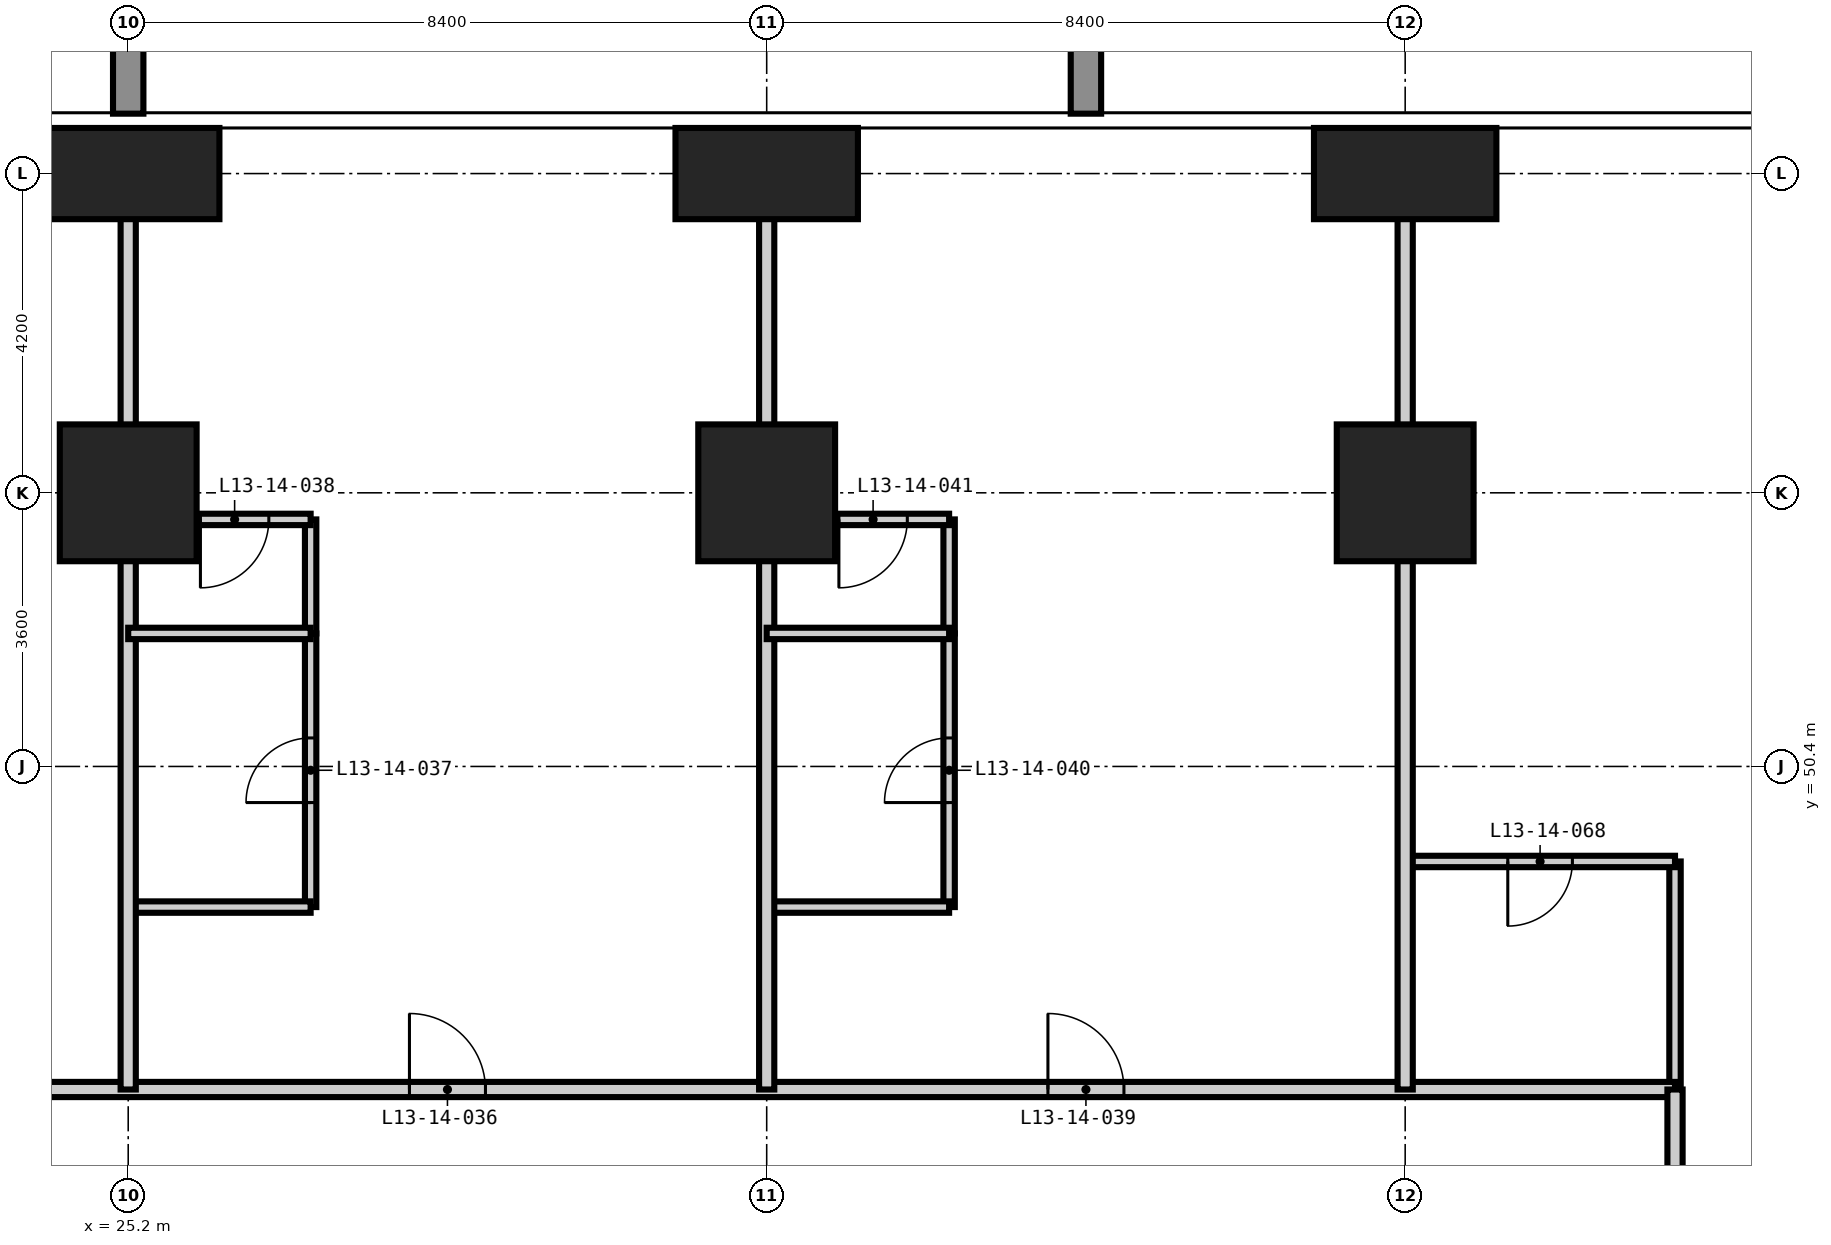
"""IFC4 building model, lengths in metres.
Left out: names, types, materials, properties, quantities, classifications, styles, units other than length and angle.
Written with IfcOpenShell. Run it as: python <this file> out.ifc"""

import sys

from ifc_helpers import new_model, si_unit, direction, frame, frame_2d, origin, origin_2d, place, context, subcontext, project, spatial, rectangle, extrude, element, fill, save


model = new_model("IFC4")
c1 = context("Model", 3, precision=1e-05, world=origin(), true_north=direction((0.0, 1.0)))
c2 = subcontext(c1, "Body", "Model", "MODEL_VIEW")
j1 = project(units=[si_unit("LENGTHUNIT", "METRE"), si_unit("PLANEANGLEUNIT", "RADIAN")], contexts=[c1])
p1 = place(None, origin())
s1 = spatial("IfcSite", under=j1, at=p1, CompositionType="ELEMENT")
p2 = place(p1, origin())
s2 = spatial("IfcBuilding", under=s1, at=p2, CompositionType="ELEMENT")
p3 = place(p2, frame((0.0, 0.0, 55.8)))
s3 = spatial("IfcBuildingStorey", under=s2, at=p3, CompositionType="ELEMENT", Elevation=55.8)
p4 = place(p3, frame((25.2, 54.0, -0.35), z_axis=(0.0, 0.0, 1.0), x_axis=(1.0, 0.0, 0.0)))
e1 = element("IfcColumn", 1, at=p4, inside=s3, PredefinedType="COLUMN", context=c2, shape_type="SweptSolid", body=[
    extrude(rectangle(XDim=1.8, YDim=1.8, at=origin_2d()), origin(), (0.0, 0.0, 1.0), 3.6),
])
p5 = place(p3, frame((25.2, 58.2, -0.35), z_axis=(0.0, 0.0, 1.0), x_axis=(1.0, 0.0, 0.0)))
e2 = element("IfcColumn", 2, at=p5, inside=s3, PredefinedType="COLUMN", context=c2, shape_type="SweptSolid", body=[
    extrude(rectangle(XDim=2.4, YDim=1.2, at=origin_2d()), origin(), (0.0, 0.0, 1.0), 3.6),
])
p6 = place(p3, frame((33.6, 54.0, -0.35), z_axis=(0.0, 0.0, 1.0), x_axis=(1.0, 0.0, 0.0)))
e3 = element("IfcColumn", 3, at=p6, inside=s3, PredefinedType="COLUMN", context=c2, shape_type="SweptSolid", body=[
    extrude(rectangle(XDim=1.8, YDim=1.8, at=origin_2d()), origin(), (0.0, 0.0, 1.0), 3.6),
])
p7 = place(p3, frame((33.6, 58.2, -0.35), z_axis=(0.0, 0.0, 1.0), x_axis=(1.0, 0.0, 0.0)))
e4 = element("IfcColumn", 4, at=p7, inside=s3, PredefinedType="COLUMN", context=c2, shape_type="SweptSolid", body=[
    extrude(rectangle(XDim=2.4, YDim=1.2, at=origin_2d()), origin(), (0.0, 0.0, 1.0), 3.6),
])
p8 = place(p3, frame((42.0, 54.0, -0.35), z_axis=(0.0, 0.0, 1.0), x_axis=(1.0, 0.0, 0.0)))
e5 = element("IfcColumn", 5, at=p8, inside=s3, PredefinedType="COLUMN", context=c2, shape_type="SweptSolid", body=[
    extrude(rectangle(XDim=1.8, YDim=1.8, at=origin_2d()), origin(), (0.0, 0.0, 1.0), 3.6),
])
p9 = place(p3, frame((42.0, 58.2, -0.35), z_axis=(0.0, 0.0, 1.0), x_axis=(1.0, 0.0, 0.0)))
e6 = element("IfcColumn", 6, at=p9, inside=s3, PredefinedType="COLUMN", context=c2, shape_type="SweptSolid", body=[
    extrude(rectangle(XDim=2.4, YDim=1.2, at=origin_2d()), origin(), (0.0, 0.0, 1.0), 3.6),
])
p10 = place(p3, frame((27.6, 48.55, 0.0), z_axis=(0.0, 0.0, 1.0), x_axis=(0.0, 1.0, 0.0)))
e7 = element("IfcWall", 7, at=p10, inside=s3, PredefinedType="PARTITIONING", context=c2, shape_type="SweptSolid", body=[
    extrude(rectangle(XDim=3.6, YDim=0.15, at=frame_2d((1.8, 0.0))), origin(), (0.0, 0.0, 1.0), 3.25),
])
p11 = place(p10, frame((1.375, 0.0, 0.0)))
e8 = element("IfcOpeningElement", 8, at=p11, cuts=e7, PredefinedType="OPENING", context=c2, shape_type="SweptSolid", body=[
    extrude(rectangle(XDim=0.85, YDim=2.1, at=frame_2d((0.425, 1.05))), frame((0.0, 0.085, 0.0), z_axis=(0.0, -1.0, 0.0), x_axis=(1.0, 0.0, 0.0)), (0.0, 0.0, 1.0), 0.17),
])
p12 = place(p3, frame((36.0, 48.55, 0.0), z_axis=(0.0, 0.0, 1.0), x_axis=(0.0, 1.0, 0.0)))
e9 = element("IfcWall", 9, at=p12, inside=s3, PredefinedType="PARTITIONING", context=c2, shape_type="SweptSolid", body=[
    extrude(rectangle(XDim=3.6, YDim=0.15, at=frame_2d((1.8, 0.0))), origin(), (0.0, 0.0, 1.0), 3.25),
])
p13 = place(p12, frame((1.375, 0.0, 0.0)))
e10 = element("IfcOpeningElement", 10, at=p13, cuts=e9, PredefinedType="OPENING", context=c2, shape_type="SweptSolid", body=[
    extrude(rectangle(XDim=0.85, YDim=2.1, at=frame_2d((0.425, 1.05))), frame((0.0, 0.085, 0.0), z_axis=(0.0, -1.0, 0.0), x_axis=(1.0, 0.0, 0.0)), (0.0, 0.0, 1.0), 0.17),
])
p14 = place(p3, frame((45.55, 46.15, 0.0), z_axis=(0.0, 0.0, 1.0), x_axis=(0.0, 1.0, 0.0)))
e11 = element("IfcWall", 11, at=p14, inside=s3, PredefinedType="PARTITIONING", context=c2, shape_type="SweptSolid", body=[
    extrude(rectangle(XDim=3.0, YDim=0.15, at=frame_2d((1.5, 0.0))), origin(), (0.0, 0.0, 1.0), 3.25),
])
p15 = place(p3, frame((25.2, 48.55, 0.0), z_axis=(0.0, 0.0, 1.0), x_axis=(1.0, 0.0, 0.0)))
e12 = element("IfcWall", 12, at=p15, inside=s3, PredefinedType="PARTITIONING", context=c2, shape_type="SweptSolid", body=[
    extrude(rectangle(XDim=2.4, YDim=0.15, at=frame_2d((1.2, 0.0))), origin(), (0.0, 0.0, 1.0), 3.25),
])
p16 = place(p3, frame((33.6, 48.55, 0.0), z_axis=(0.0, 0.0, 1.0), x_axis=(1.0, 0.0, 0.0)))
e13 = element("IfcWall", 13, at=p16, inside=s3, PredefinedType="PARTITIONING", context=c2, shape_type="SweptSolid", body=[
    extrude(rectangle(XDim=2.4, YDim=0.15, at=frame_2d((1.2, 0.0))), origin(), (0.0, 0.0, 1.0), 3.25),
])
p17 = place(p3, frame((42.0, 49.15, 0.0), z_axis=(0.0, 0.0, 1.0), x_axis=(1.0, 0.0, 0.0)))
e14 = element("IfcWall", 14, at=p17, inside=s3, PredefinedType="PARTITIONING", context=c2, shape_type="SweptSolid", body=[
    extrude(rectangle(XDim=3.55, YDim=0.15, at=frame_2d((1.775, 0.0))), origin(), (0.0, 0.0, 1.0), 3.25),
])
p18 = place(p17, frame((1.35, 0.0, 0.0)))
e15 = element("IfcOpeningElement", 15, at=p18, cuts=e14, PredefinedType="OPENING", context=c2, shape_type="SweptSolid", body=[
    extrude(rectangle(XDim=0.85, YDim=2.1, at=frame_2d((0.425, 1.05))), frame((0.0, 0.085, 0.0), z_axis=(0.0, -1.0, 0.0), x_axis=(1.0, 0.0, 0.0)), (0.0, 0.0, 1.0), 0.17),
])
p19 = place(p3, frame((13.85, 46.15, 0.0), z_axis=(0.0, 0.0, 1.0), x_axis=(1.0, 0.0, 0.0)))
e16 = element("IfcWall", 16, at=p19, inside=s3, PredefinedType="PARTITIONING", context=c2, shape_type="SweptSolid", body=[
    extrude(rectangle(XDim=31.7, YDim=0.2, at=frame_2d((15.85, 0.0))), origin(), (0.0, 0.0, 1.0), 3.25),
])
p20 = place(p19, frame((6.65, 0.0, 0.0)))
e17 = element("IfcOpeningElement", 17, at=p20, cuts=e16, PredefinedType="OPENING", context=c2, shape_type="SweptSolid", body=[
    extrude(rectangle(XDim=1.0, YDim=2.2, at=frame_2d((0.5, 1.1))), frame((0.0, 0.11, 0.0), z_axis=(0.0, -1.0, 0.0), x_axis=(1.0, 0.0, 0.0)), (0.0, 0.0, 1.0), 0.22),
])
p21 = place(p19, frame((15.05, 0.0, 0.0)))
e18 = element("IfcOpeningElement", 18, at=p21, cuts=e16, PredefinedType="OPENING", context=c2, shape_type="SweptSolid", body=[
    extrude(rectangle(XDim=1.0, YDim=2.2, at=frame_2d((0.5, 1.1))), frame((0.0, 0.11, 0.0), z_axis=(0.0, -1.0, 0.0), x_axis=(1.0, 0.0, 0.0)), (0.0, 0.0, 1.0), 0.22),
])
p22 = place(p19, frame((23.45, 0.0, 0.0)))
e19 = element("IfcOpeningElement", 19, at=p22, cuts=e16, PredefinedType="OPENING", context=c2, shape_type="SweptSolid", body=[
    extrude(rectangle(XDim=1.0, YDim=2.2, at=frame_2d((0.5, 1.1))), frame((0.0, 0.11, 0.0), z_axis=(0.0, -1.0, 0.0), x_axis=(1.0, 0.0, 0.0)), (0.0, 0.0, 1.0), 0.22),
])
p23 = place(p3, frame((45.55, 46.15, 0.0), z_axis=(0.0, 0.0, 1.0), x_axis=(0.0, -1.0, 0.0)))
e20 = element("IfcWall", 20, at=p23, inside=s3, PredefinedType="PARTITIONING", context=c2, shape_type="SweptSolid", body=[
    extrude(rectangle(XDim=32.3, YDim=0.2, at=frame_2d((16.15, 0.0))), origin(), (0.0, 0.0, 1.0), 3.25),
])
p24 = place(p23, frame((25.85, 0.0, 0.0)))
e21 = element("IfcOpeningElement", 21, at=p24, cuts=e20, PredefinedType="OPENING", context=c2, shape_type="SweptSolid", body=[
    extrude(rectangle(XDim=1.0, YDim=2.2, at=frame_2d((0.5, 1.1))), frame((0.0, 0.11, 0.0), z_axis=(0.0, -1.0, 0.0), x_axis=(1.0, 0.0, 0.0)), (0.0, 0.0, 1.0), 0.22),
])
p25 = place(p23, frame((17.45, 0.0, 0.0)))
e22 = element("IfcOpeningElement", 22, at=p25, cuts=e20, PredefinedType="OPENING", context=c2, shape_type="SweptSolid", body=[
    extrude(rectangle(XDim=1.0, YDim=2.2, at=frame_2d((0.5, 1.1))), frame((0.0, 0.11, 0.0), z_axis=(0.0, -1.0, 0.0), x_axis=(1.0, 0.0, 0.0)), (0.0, 0.0, 1.0), 0.22),
])
p26 = place(p23, frame((9.05, 0.0, 0.0)))
e23 = element("IfcOpeningElement", 23, at=p26, cuts=e20, PredefinedType="OPENING", context=c2, shape_type="SweptSolid", body=[
    extrude(rectangle(XDim=1.0, YDim=2.2, at=frame_2d((0.5, 1.1))), frame((0.0, 0.11, 0.0), z_axis=(0.0, -1.0, 0.0), x_axis=(1.0, 0.0, 0.0)), (0.0, 0.0, 1.0), 0.22),
])
p27 = place(p23, frame((30.325, 0.0, 0.0)))
e24 = element("IfcOpeningElement", 24, at=p27, cuts=e20, PredefinedType="OPENING", context=c2, shape_type="SweptSolid", body=[
    extrude(rectangle(XDim=1.0, YDim=2.2, at=frame_2d((0.5, 1.1))), frame((0.0, 0.11, 0.0), z_axis=(0.0, -1.0, 0.0), x_axis=(1.0, 0.0, 0.0)), (0.0, 0.0, 1.0), 0.22),
])
p28 = place(p23, frame((1.575, 0.0, 0.0)))
e25 = element("IfcOpeningElement", 25, at=p28, cuts=e20, PredefinedType="OPENING", context=c2, shape_type="SweptSolid", body=[
    extrude(rectangle(XDim=1.0, YDim=2.2, at=frame_2d((0.5, 1.1))), frame((0.0, 0.11, 0.0), z_axis=(0.0, -1.0, 0.0), x_axis=(1.0, 0.0, 0.0)), (0.0, 0.0, 1.0), 0.22),
])
for number, where, z_axis, x_axis in (
    (26, (25.2, 46.15, 0.0), (0.0, 0.0, 1.0), (0.0, 1.0, 0.0)),
    (27, (33.6, 46.15, 0.0), (0.0, 0.0, 1.0), (0.0, 1.0, 0.0)),
    (28, (42.0, 46.15, 0.0), (0.0, 0.0, 1.0), (0.0, 1.0, 0.0)),
):
    element("IfcWall", number, at=place(p3, frame(where, z_axis=z_axis, x_axis=x_axis)), inside=s3, PredefinedType="PARTITIONING", context=c2, shape_type="SweptSolid", body=[
        extrude(rectangle(XDim=12.658, YDim=0.2, at=frame_2d((6.329, 0.0))), origin(), (0.0, 0.0, 1.0), 3.25),
    ])
for number, where, z_axis, x_axis in (
    (29, (27.6, 52.15, 0.0), (0.0, 0.0, 1.0), (0.0, 1.0, 0.0)),
    (30, (36.0, 52.15, 0.0), (0.0, 0.0, 1.0), (0.0, 1.0, 0.0)),
):
    element("IfcWall", number, at=place(p3, frame(where, z_axis=z_axis, x_axis=x_axis)), inside=s3, PredefinedType="PARTITIONING", context=c2, shape_type="SweptSolid", body=[
        extrude(rectangle(XDim=1.5, YDim=0.15, at=frame_2d((0.75, 0.0))), origin(), (0.0, 0.0, 1.0), 3.25),
    ])
p29 = place(p3, frame((25.2, 52.15, 0.0), z_axis=(0.0, 0.0, 1.0), x_axis=(1.0, 0.0, 0.0)))
e31 = element("IfcWall", 31, at=p29, inside=s3, PredefinedType="PARTITIONING", context=c2, shape_type="SweptSolid", body=[
    extrude(rectangle(XDim=2.4, YDim=0.15, at=frame_2d((1.2, 0.0))), origin(), (0.0, 0.0, 1.0), 3.25),
])
p30 = place(p3, frame((33.6, 52.15, 0.0), z_axis=(0.0, 0.0, 1.0), x_axis=(1.0, 0.0, 0.0)))
e32 = element("IfcWall", 32, at=p30, inside=s3, PredefinedType="PARTITIONING", context=c2, shape_type="SweptSolid", body=[
    extrude(rectangle(XDim=2.4, YDim=0.15, at=frame_2d((1.2, 0.0))), origin(), (0.0, 0.0, 1.0), 3.25),
])
p31 = place(p3, frame((25.2, 53.65, 0.0), z_axis=(0.0, 0.0, 1.0), x_axis=(1.0, 0.0, 0.0)))
e33 = element("IfcWall", 33, at=p31, inside=s3, PredefinedType="PARTITIONING", context=c2, shape_type="SweptSolid", body=[
    extrude(rectangle(XDim=2.4, YDim=0.15, at=frame_2d((1.2, 0.0))), origin(), (0.0, 0.0, 1.0), 3.25),
])
p32 = place(p31, frame((0.95, 0.0, 0.0)))
e34 = element("IfcOpeningElement", 34, at=p32, cuts=e33, PredefinedType="OPENING", context=c2, shape_type="SweptSolid", body=[
    extrude(rectangle(XDim=0.9, YDim=2.1, at=frame_2d((0.45, 1.05))), frame((0.0, 0.085, 0.0), z_axis=(0.0, -1.0, 0.0), x_axis=(1.0, 0.0, 0.0)), (0.0, 0.0, 1.0), 0.17),
])
p33 = place(p3, frame((33.6, 53.65, 0.0), z_axis=(0.0, 0.0, 1.0), x_axis=(1.0, 0.0, 0.0)))
e35 = element("IfcWall", 35, at=p33, inside=s3, PredefinedType="PARTITIONING", context=c2, shape_type="SweptSolid", body=[
    extrude(rectangle(XDim=2.4, YDim=0.15, at=frame_2d((1.2, 0.0))), origin(), (0.0, 0.0, 1.0), 3.25),
])
p34 = place(p33, frame((0.95, 0.0, 0.0)))
e36 = element("IfcOpeningElement", 36, at=p34, cuts=e35, PredefinedType="OPENING", context=c2, shape_type="SweptSolid", body=[
    extrude(rectangle(XDim=0.9, YDim=2.1, at=frame_2d((0.45, 1.05))), frame((0.0, 0.085, 0.0), z_axis=(0.0, -1.0, 0.0), x_axis=(1.0, 0.0, 0.0)), (0.0, 0.0, 1.0), 0.17),
])
p35 = place(p21, origin())
e37 = element("IfcDoor", 37, at=p35, inside=s3, OperationType="SINGLE_SWING_LEFT", PredefinedType="DOOR", context=c2, shape_type="SweptSolid", body=[
    extrude(rectangle(XDim=1.0, YDim=2.2, at=frame_2d((0.5, 1.1))), frame((0.0, 0.025, 0.0), z_axis=(0.0, -1.0, 0.0), x_axis=(1.0, 0.0, 0.0)), (0.0, 0.0, 1.0), 0.05),
])
fill(e18, e37)
p36 = place(p11, origin())
e38 = element("IfcDoor", 38, at=p36, inside=s3, OperationType="SINGLE_SWING_LEFT", PredefinedType="DOOR", context=c2, shape_type="SweptSolid", body=[
    extrude(rectangle(XDim=0.85, YDim=2.1, at=frame_2d((0.425, 1.05))), frame((0.0, 0.025, 0.0), z_axis=(0.0, -1.0, 0.0), x_axis=(1.0, 0.0, 0.0)), (0.0, 0.0, 1.0), 0.05),
])
fill(e8, e38)
p37 = place(p32, frame((0.9, 0.0, 0.0), z_axis=(0.0, 0.0, 1.0), x_axis=(-1.0, 0.0, 0.0)))
e39 = element("IfcDoor", 39, at=p37, inside=s3, OperationType="SINGLE_SWING_RIGHT", PredefinedType="DOOR", context=c2, shape_type="SweptSolid", body=[
    extrude(rectangle(XDim=0.9, YDim=2.1, at=frame_2d((0.45, 1.05))), frame((0.0, 0.025, 0.0), z_axis=(0.0, -1.0, 0.0), x_axis=(1.0, 0.0, 0.0)), (0.0, 0.0, 1.0), 0.05),
])
fill(e34, e39)
p38 = place(p22, origin())
e40 = element("IfcDoor", 40, at=p38, inside=s3, OperationType="SINGLE_SWING_LEFT", PredefinedType="DOOR", context=c2, shape_type="SweptSolid", body=[
    extrude(rectangle(XDim=1.0, YDim=2.2, at=frame_2d((0.5, 1.1))), frame((0.0, 0.025, 0.0), z_axis=(0.0, -1.0, 0.0), x_axis=(1.0, 0.0, 0.0)), (0.0, 0.0, 1.0), 0.05),
])
fill(e19, e40)
p39 = place(p13, origin())
e41 = element("IfcDoor", 41, at=p39, inside=s3, OperationType="SINGLE_SWING_LEFT", PredefinedType="DOOR", context=c2, shape_type="SweptSolid", body=[
    extrude(rectangle(XDim=0.85, YDim=2.1, at=frame_2d((0.425, 1.05))), frame((0.0, 0.025, 0.0), z_axis=(0.0, -1.0, 0.0), x_axis=(1.0, 0.0, 0.0)), (0.0, 0.0, 1.0), 0.05),
])
fill(e10, e41)
p40 = place(p34, frame((0.9, 0.0, 0.0), z_axis=(0.0, 0.0, 1.0), x_axis=(-1.0, 0.0, 0.0)))
e42 = element("IfcDoor", 42, at=p40, inside=s3, OperationType="SINGLE_SWING_RIGHT", PredefinedType="DOOR", context=c2, shape_type="SweptSolid", body=[
    extrude(rectangle(XDim=0.9, YDim=2.1, at=frame_2d((0.45, 1.05))), frame((0.0, 0.025, 0.0), z_axis=(0.0, -1.0, 0.0), x_axis=(1.0, 0.0, 0.0)), (0.0, 0.0, 1.0), 0.05),
])
fill(e36, e42)
p41 = place(p18, frame((0.85, 0.0, 0.0), z_axis=(0.0, 0.0, 1.0), x_axis=(-1.0, 0.0, 0.0)))
e43 = element("IfcDoor", 43, at=p41, inside=s3, OperationType="SINGLE_SWING_RIGHT", PredefinedType="DOOR", context=c2, shape_type="SweptSolid", body=[
    extrude(rectangle(XDim=0.85, YDim=2.1, at=frame_2d((0.425, 1.05))), frame((0.0, 0.025, 0.0), z_axis=(0.0, -1.0, 0.0), x_axis=(1.0, 0.0, 0.0)), (0.0, 0.0, 1.0), 0.05),
])
fill(e15, e43)
save(model, sys.argv[1])
